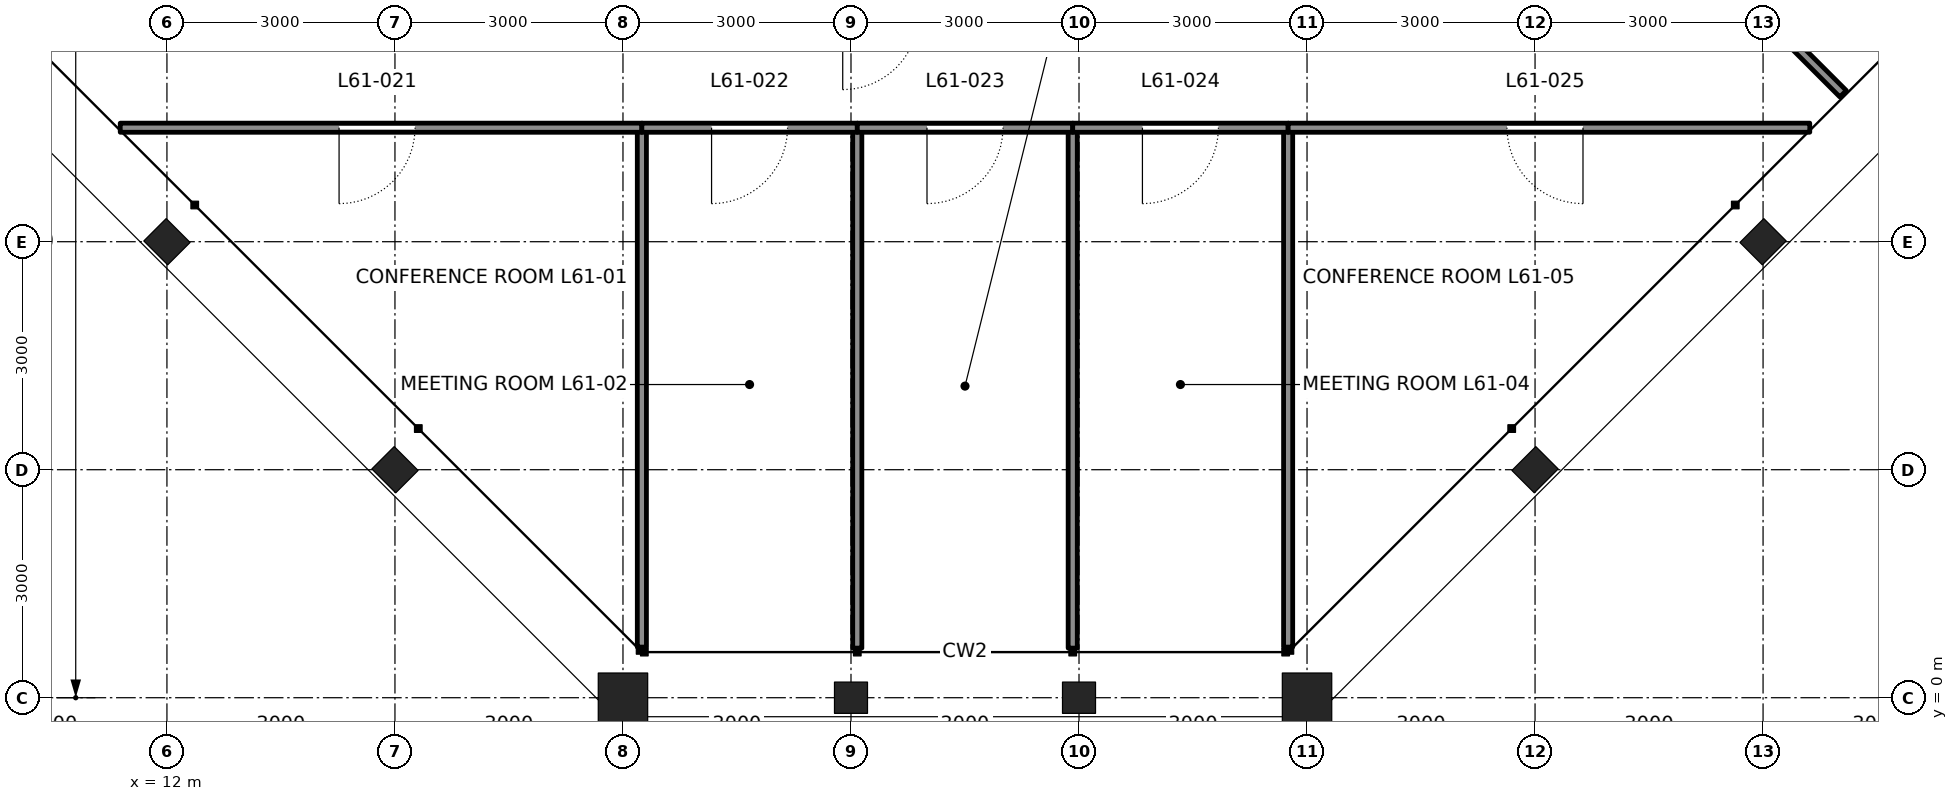
"""IFC4 building model, lengths in metres.
Left out: names, types, materials, properties, quantities, classifications, styles, units other than length and angle.
Written with IfcOpenShell. Run it as: python <this file> out.ifc"""

import sys

from ifc_helpers import new_model, si_unit, direction, frame, frame_2d, origin, origin_2d, place, context, subcontext, project, spatial, rectangle, hollow_rectangle, i_section, extrude, element, fill, save


model = new_model("IFC4")
c1 = context("Model", 3, precision=1e-05, world=origin(), true_north=direction((0.0, 1.0)))
c2 = subcontext(c1, "Body", "Model", "MODEL_VIEW")
j1 = project(units=[si_unit("LENGTHUNIT", "METRE"), si_unit("PLANEANGLEUNIT", "RADIAN")], contexts=[c1])
p1 = place(None, origin())
s1 = spatial("IfcSite", under=j1, at=p1, CompositionType="ELEMENT")
p2 = place(p1, origin())
s2 = spatial("IfcBuilding", under=s1, at=p2, CompositionType="ELEMENT")
p3 = place(p2, frame((0.0, 0.0, 274.8)))
s3 = spatial("IfcBuildingStorey", under=s2, at=p3, CompositionType="ELEMENT", Elevation=274.8)
p4 = place(p3, frame((18.0, 0.0, 0.0), z_axis=(0.0, 0.0, 1.0), x_axis=(0.0, -1.0, 0.0)))
e1 = element("IfcColumn", 1, at=p4, inside=s3, PredefinedType="COLUMN", context=c2, shape_type="SweptSolid", body=[
    extrude(hollow_rectangle(XDim=0.65, YDim=0.65, WallThickness=0.065, at=origin_2d()), origin(), (0.0, 0.0, 1.0), 4.2),
])
for number, where, z_axis, x_axis in (
    (2, (21.0, 0.0, 0.0), (0.0, 0.0, 1.0), (0.0, -1.0, 0.0)),
    (3, (24.0, 0.0, 0.0), (0.0, 0.0, 1.0), (0.0, -1.0, 0.0)),
):
    element("IfcColumn", number, at=place(p3, frame(where, z_axis=z_axis, x_axis=x_axis)), inside=s3, PredefinedType="COLUMN", context=c2, shape_type="SweptSolid", body=[
        extrude(i_section(OverallWidth=0.411, OverallDepth=0.434, WebThickness=0.036, FlangeThickness=0.057, at=origin_2d()), origin(), (0.0, 0.0, 1.0), 4.2),
    ])
p5 = place(p3, frame((27.0, 0.0, 0.0), z_axis=(0.0, 0.0, 1.0), x_axis=(0.0, -1.0, 0.0)))
e4 = element("IfcColumn", 4, at=p5, inside=s3, PredefinedType="COLUMN", context=c2, shape_type="SweptSolid", body=[
    extrude(hollow_rectangle(XDim=0.65, YDim=0.65, WallThickness=0.065, at=origin_2d()), origin(), (0.0, 0.0, 1.0), 4.2),
])
for number, where, z_axis, x_axis in (
    (5, (30.0, 3.0, 0.0), (0.0, 0.0, 1.0), (0.707, -0.707, 0.0)),
    (6, (33.0, 6.0, 0.0), (0.0, 0.0, 1.0), (0.707, -0.707, 0.0)),
    (7, (12.0, 6.0, 0.0), (0.0, 0.0, 1.0), (-0.707, -0.707, 0.0)),
    (8, (15.0, 3.0, 0.0), (0.0, 0.0, 1.0), (-0.707, -0.707, 0.0)),
):
    element("IfcColumn", number, at=place(p3, frame(where, z_axis=z_axis, x_axis=x_axis)), inside=s3, PredefinedType="COLUMN", context=c2, shape_type="SweptSolid", body=[
        extrude(i_section(OverallWidth=0.417, OverallDepth=0.445, WebThickness=0.039, FlangeThickness=0.063, at=origin_2d()), origin(), (0.0, 0.0, 1.0), 4.2),
    ])
p6 = place(p3, frame((18.249, 0.666, 0.0), z_axis=(0.0, 0.0, 1.0), x_axis=(0.0, 1.0, 0.0)))
e9 = element("IfcWall", 9, at=p6, inside=s3, PredefinedType="PARTITIONING", context=c2, shape_type="SweptSolid", body=[
    extrude(rectangle(XDim=6.834, YDim=0.12, at=frame_2d((3.417, 0.0))), origin(), (0.0, 0.0, 1.0), 4.04),
])
for number, where, z_axis, x_axis in (
    (10, (21.083, 0.653, 0.0), (0.0, 0.0, 1.0), (0.0, 1.0, 0.0)),
    (11, (23.917, 0.653, 0.0), (0.0, 0.0, 1.0), (0.0, 1.0, 0.0)),
):
    element("IfcWall", number, at=place(p3, frame(where, z_axis=z_axis, x_axis=x_axis)), inside=s3, PredefinedType="PARTITIONING", context=c2, shape_type="SweptSolid", body=[
        extrude(rectangle(XDim=6.847, YDim=0.12, at=frame_2d((3.424, 0.0))), origin(), (0.0, 0.0, 1.0), 3.357),
    ])
p7 = place(p3, frame((26.751, 0.666, 0.0), z_axis=(0.0, 0.0, 1.0), x_axis=(0.0, 1.0, 0.0)))
e12 = element("IfcWall", 12, at=p7, inside=s3, PredefinedType="PARTITIONING", context=c2, shape_type="SweptSolid", body=[
    extrude(rectangle(XDim=6.834, YDim=0.12, at=frame_2d((3.417, 0.0))), origin(), (0.0, 0.0, 1.0), 4.04),
])
p8 = place(p3, frame((11.385, 7.5, 0.0), z_axis=(0.0, 0.0, 1.0), x_axis=(1.0, 0.0, 0.0)))
e13 = element("IfcWall", 13, at=p8, inside=s3, PredefinedType="PARTITIONING", context=c2, shape_type="SweptSolid", body=[
    extrude(rectangle(XDim=6.863, YDim=0.12, at=frame_2d((3.432, 0.0))), origin(), (0.0, 0.0, 1.0), 4.04),
])
p9 = place(p8, frame((2.879, 0.0, 0.0)))
e14 = element("IfcOpeningElement", 14, at=p9, cuts=e13, PredefinedType="OPENING", context=c2, shape_type="SweptSolid", body=[
    extrude(rectangle(XDim=1.0, YDim=2.4, at=frame_2d((0.5, 1.2))), frame((0.0, 0.07, 0.0), z_axis=(0.0, -1.0, 0.0), x_axis=(1.0, 0.0, 0.0)), (0.0, 0.0, 1.0), 0.14),
])
p10 = place(p3, frame((18.249, 7.5, 0.0), z_axis=(0.0, 0.0, 1.0), x_axis=(1.0, 0.0, 0.0)))
e15 = element("IfcWall", 15, at=p10, inside=s3, PredefinedType="PARTITIONING", context=c2, shape_type="SweptSolid", body=[
    extrude(rectangle(XDim=2.834, YDim=0.12, at=frame_2d((1.417, 0.0))), origin(), (0.0, 0.0, 1.0), 4.04),
])
p11 = place(p10, frame((0.917, 0.0, 0.0)))
e16 = element("IfcOpeningElement", 16, at=p11, cuts=e15, PredefinedType="OPENING", context=c2, shape_type="SweptSolid", body=[
    extrude(rectangle(XDim=1.0, YDim=2.4, at=frame_2d((0.5, 1.2))), frame((0.0, 0.07, 0.0), z_axis=(0.0, -1.0, 0.0), x_axis=(1.0, 0.0, 0.0)), (0.0, 0.0, 1.0), 0.14),
])
p12 = place(p3, frame((21.083, 7.5, 0.0), z_axis=(0.0, 0.0, 1.0), x_axis=(1.0, 0.0, 0.0)))
e17 = element("IfcWall", 17, at=p12, inside=s3, PredefinedType="PARTITIONING", context=c2, shape_type="SweptSolid", body=[
    extrude(rectangle(XDim=2.834, YDim=0.12, at=frame_2d((1.417, 0.0))), origin(), (0.0, 0.0, 1.0), 4.04),
])
p13 = place(p12, frame((0.917, 0.0, 0.0)))
e18 = element("IfcOpeningElement", 18, at=p13, cuts=e17, PredefinedType="OPENING", context=c2, shape_type="SweptSolid", body=[
    extrude(rectangle(XDim=1.0, YDim=2.4, at=frame_2d((0.5, 1.2))), frame((0.0, 0.07, 0.0), z_axis=(0.0, -1.0, 0.0), x_axis=(1.0, 0.0, 0.0)), (0.0, 0.0, 1.0), 0.14),
])
p14 = place(p3, frame((23.917, 7.5, 0.0), z_axis=(0.0, 0.0, 1.0), x_axis=(1.0, 0.0, 0.0)))
e19 = element("IfcWall", 19, at=p14, inside=s3, PredefinedType="PARTITIONING", context=c2, shape_type="SweptSolid", body=[
    extrude(rectangle(XDim=2.834, YDim=0.12, at=frame_2d((1.417, 0.0))), origin(), (0.0, 0.0, 1.0), 4.04),
])
p15 = place(p14, frame((0.917, 0.0, 0.0)))
e20 = element("IfcOpeningElement", 20, at=p15, cuts=e19, PredefinedType="OPENING", context=c2, shape_type="SweptSolid", body=[
    extrude(rectangle(XDim=1.0, YDim=2.4, at=frame_2d((0.5, 1.2))), frame((0.0, 0.07, 0.0), z_axis=(0.0, -1.0, 0.0), x_axis=(1.0, 0.0, 0.0)), (0.0, 0.0, 1.0), 0.14),
])
p16 = place(p3, frame((26.751, 7.5, 0.0), z_axis=(0.0, 0.0, 1.0), x_axis=(1.0, 0.0, 0.0)))
e21 = element("IfcWall", 21, at=p16, inside=s3, PredefinedType="PARTITIONING", context=c2, shape_type="SweptSolid", body=[
    extrude(rectangle(XDim=6.863, YDim=0.12, at=frame_2d((3.432, 0.0))), origin(), (0.0, 0.0, 1.0), 4.04),
])
p17 = place(p16, frame((2.879, 0.0, 0.0)))
e22 = element("IfcOpeningElement", 22, at=p17, cuts=e21, PredefinedType="OPENING", context=c2, shape_type="SweptSolid", body=[
    extrude(rectangle(XDim=1.0, YDim=2.4, at=frame_2d((0.5, 1.2))), frame((0.0, 0.07, 0.0), z_axis=(0.0, -1.0, 0.0), x_axis=(1.0, 0.0, 0.0)), (0.0, 0.0, 1.0), 0.14),
])
p18 = place(p3, frame((33.0, 9.0, 0.0), z_axis=(0.0, 0.0, 1.0), x_axis=(0.707106781187, -0.707106781187, 0.0)))
e23 = element("IfcWall", 23, at=p18, inside=s3, PredefinedType="PARTITIONING", context=c2, shape_type="SweptSolid", body=[
    extrude(rectangle(XDim=1.489, YDim=0.12, at=frame_2d((0.745, 0.0))), origin(), (0.0, 0.0, 1.0), 4.04),
])
p19 = place(p9, frame((1.0, 0.0, 0.0), z_axis=(0.0, 0.0, 1.0), x_axis=(-1.0, 0.0, 0.0)))
e24 = element("IfcDoor", 24, at=p19, inside=s3, OperationType="SINGLE_SWING_RIGHT", PredefinedType="DOOR", context=c2, shape_type="SweptSolid", body=[
    extrude(rectangle(XDim=1.0, YDim=2.4, at=frame_2d((0.5, 1.2))), frame((0.0, 0.025, 0.0), z_axis=(0.0, -1.0, 0.0), x_axis=(1.0, 0.0, 0.0)), (0.0, 0.0, 1.0), 0.05),
])
fill(e14, e24)
p20 = place(p11, frame((1.0, 0.0, 0.0), z_axis=(0.0, 0.0, 1.0), x_axis=(-1.0, 0.0, 0.0)))
e25 = element("IfcDoor", 25, at=p20, inside=s3, OperationType="SINGLE_SWING_RIGHT", PredefinedType="DOOR", context=c2, shape_type="SweptSolid", body=[
    extrude(rectangle(XDim=1.0, YDim=2.4, at=frame_2d((0.5, 1.2))), frame((0.0, 0.025, 0.0), z_axis=(0.0, -1.0, 0.0), x_axis=(1.0, 0.0, 0.0)), (0.0, 0.0, 1.0), 0.05),
])
fill(e16, e25)
p21 = place(p13, frame((1.0, 0.0, 0.0), z_axis=(0.0, 0.0, 1.0), x_axis=(-1.0, 0.0, 0.0)))
e26 = element("IfcDoor", 26, at=p21, inside=s3, OperationType="SINGLE_SWING_RIGHT", PredefinedType="DOOR", context=c2, shape_type="SweptSolid", body=[
    extrude(rectangle(XDim=1.0, YDim=2.4, at=frame_2d((0.5, 1.2))), frame((0.0, 0.025, 0.0), z_axis=(0.0, -1.0, 0.0), x_axis=(1.0, 0.0, 0.0)), (0.0, 0.0, 1.0), 0.05),
])
fill(e18, e26)
p22 = place(p15, frame((1.0, 0.0, 0.0), z_axis=(0.0, 0.0, 1.0), x_axis=(-1.0, 0.0, 0.0)))
e27 = element("IfcDoor", 27, at=p22, inside=s3, OperationType="SINGLE_SWING_RIGHT", PredefinedType="DOOR", context=c2, shape_type="SweptSolid", body=[
    extrude(rectangle(XDim=1.0, YDim=2.4, at=frame_2d((0.5, 1.2))), frame((0.0, 0.025, 0.0), z_axis=(0.0, -1.0, 0.0), x_axis=(1.0, 0.0, 0.0)), (0.0, 0.0, 1.0), 0.05),
])
fill(e20, e27)
p23 = place(p17, frame((1.0, 0.0, 0.0), z_axis=(0.0, 0.0, 1.0), x_axis=(-1.0, 0.0, 0.0)))
e28 = element("IfcDoor", 28, at=p23, inside=s3, OperationType="SINGLE_SWING_LEFT", PredefinedType="DOOR", context=c2, shape_type="SweptSolid", body=[
    extrude(rectangle(XDim=1.0, YDim=2.4, at=frame_2d((0.5, 1.2))), frame((0.0, 0.025, 0.0), z_axis=(0.0, -1.0, 0.0), x_axis=(1.0, 0.0, 0.0)), (0.0, 0.0, 1.0), 0.05),
])
fill(e22, e28)
save(model, sys.argv[1])
